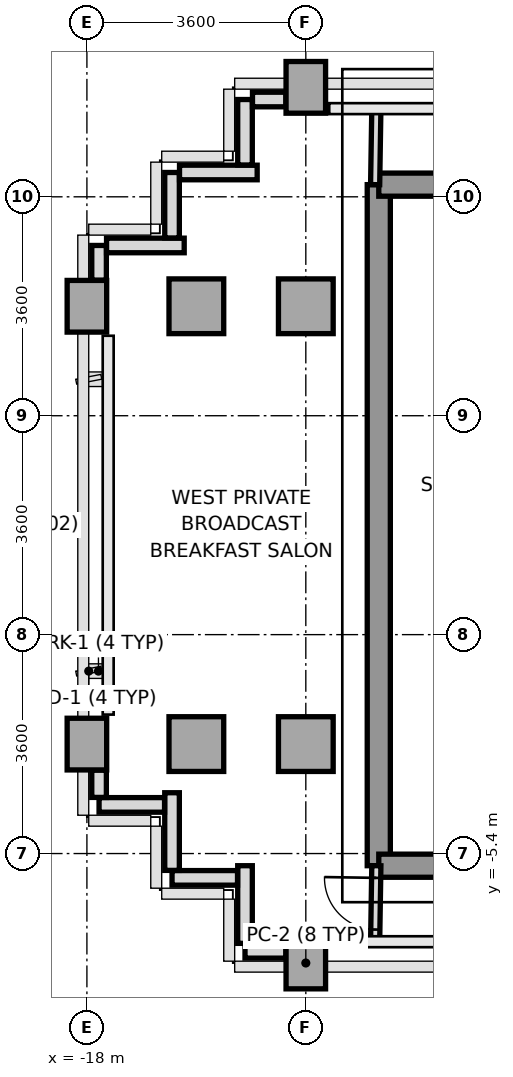
"""IFC4 building model, lengths in metres.
Left out: names, types, materials, properties, quantities, classifications, styles, units other than length and angle.
Written with IfcOpenShell. Run it as: python <this file> out.ifc"""

import sys

from ifc_helpers import new_model, si_unit, direction, frame, frame_2d, origin, origin_2d, place, context, subcontext, project, spatial, rectangle, extrude, source, transform, mapped, element, fill, save


model = new_model("IFC4")
c1 = context("Model", 3, precision=1e-05, world=origin(), true_north=direction((0.0, 1.0)))
c2 = subcontext(c1, "Body", "Model", "MODEL_VIEW")
j1 = project(units=[si_unit("LENGTHUNIT", "METRE"), si_unit("PLANEANGLEUNIT", "RADIAN")], contexts=[c1])
p1 = place(None, origin())
s1 = spatial("IfcSite", under=j1, at=p1, CompositionType="ELEMENT")
p2 = place(p1, origin())
s2 = spatial("IfcBuilding", under=s1, at=p2, CompositionType="ELEMENT")
p3 = place(p2, frame((0.0, 0.0, 197.8)))
s3 = spatial("IfcBuildingStorey", under=s2, at=p3, CompositionType="ELEMENT", Elevation=197.8)
m1 = source(origin(), c2, "Body", "SweptSolid", [
    extrude(rectangle(XDim=0.65, YDim=0.85, at=origin_2d()), origin(), (0.0, 0.0, 1.0), 3.2),
])
for number, where, z_axis, x_axis in (
    (1, (-18.0, -3.6, 0.0), (0.0, 0.0, 1.0), (1.0, 0.0, 0.0)),
    (2, (-18.0, 3.6, 0.0), (0.0, 0.0, 1.0), (1.0, 0.0, 0.0)),
):
    element("IfcColumn", number, at=place(p3, frame(where, z_axis=z_axis, x_axis=x_axis)), inside=s3, PredefinedType="COLUMN", context=c2, shape_type="MappedRepresentation", body=[
        mapped(m1, transform((0.0, 0.0, 0.0), x_axis=(1.0, 0.0, 0.0), y_axis=(0.0, 1.0, 0.0), z_axis=(0.0, 0.0, 1.0), scale=1.0)),
    ])
m2 = source(origin(), c2, "Body", "SweptSolid", [
    extrude(rectangle(XDim=0.9, YDim=0.9, at=origin_2d()), origin(), (0.0, 0.0, 1.0), 3.2),
])
for number, where, z_axis, x_axis in (
    (3, (-16.2, -3.6, 0.0), (0.0, 0.0, 1.0), (1.0, 0.0, 0.0)),
    (4, (-16.2, 3.6, 0.0), (0.0, 0.0, 1.0), (1.0, 0.0, 0.0)),
):
    element("IfcColumn", number, at=place(p3, frame(where, z_axis=z_axis, x_axis=x_axis)), inside=s3, PredefinedType="COLUMN", context=c2, shape_type="MappedRepresentation", body=[
        mapped(m2, transform((0.0, 0.0, 0.0), x_axis=(1.0, 0.0, 0.0), y_axis=(0.0, 1.0, 0.0), z_axis=(0.0, 0.0, 1.0), scale=1.0)),
    ])
p4 = place(p3, frame((-14.4, -7.2, 0.0), z_axis=(0.0, 0.0, 1.0), x_axis=(1.0, 0.0, 0.0)))
e5 = element("IfcColumn", 5, at=p4, inside=s3, PredefinedType="COLUMN", context=c2, shape_type="MappedRepresentation", body=[
    mapped(m1, transform((0.0, 0.0, 0.0), x_axis=(1.0, 0.0, 0.0), y_axis=(0.0, 1.0, 0.0), z_axis=(0.0, 0.0, 1.0), scale=1.0)),
])
for number, where, z_axis, x_axis in (
    (6, (-14.4, -3.6, 0.0), (0.0, 0.0, 1.0), (1.0, 0.0, 0.0)),
    (7, (-14.4, 3.6, 0.0), (0.0, 0.0, 1.0), (1.0, 0.0, 0.0)),
):
    element("IfcColumn", number, at=place(p3, frame(where, z_axis=z_axis, x_axis=x_axis)), inside=s3, PredefinedType="COLUMN", context=c2, shape_type="MappedRepresentation", body=[
        mapped(m2, transform((0.0, 0.0, 0.0), x_axis=(1.0, 0.0, 0.0), y_axis=(0.0, 1.0, 0.0), z_axis=(0.0, 0.0, 1.0), scale=1.0)),
    ])
p5 = place(p3, frame((-14.4, 7.2, 0.0), z_axis=(0.0, 0.0, 1.0), x_axis=(1.0, 0.0, 0.0)))
e8 = element("IfcColumn", 8, at=p5, inside=s3, PredefinedType="COLUMN", context=c2, shape_type="MappedRepresentation", body=[
    mapped(m1, transform((0.0, 0.0, 0.0), x_axis=(1.0, 0.0, 0.0), y_axis=(0.0, 1.0, 0.0), z_axis=(0.0, 0.0, 1.0), scale=1.0)),
])
p6 = place(p3, frame((-14.728, -7.0, 0.0), z_axis=(0.0, 0.0, 1.0), x_axis=(-1.0, 0.0, 0.0)))
e9 = element("IfcWall", 9, at=p6, inside=s3, PredefinedType="PARAPET", context=c2, shape_type="SweptSolid", body=[
    extrude(rectangle(XDim=0.672, YDim=0.24, at=frame_2d((0.336, 0.0))), origin(), (0.0, 0.0, 1.0), 1.15),
])
p7 = place(p3, frame((-15.4, -6.877, 0.0), z_axis=(0.0, 0.0, 1.0), x_axis=(0.0, 1.0, 0.0)))
e10 = element("IfcWall", 10, at=p7, inside=s3, PredefinedType="PARAPET", context=c2, shape_type="SweptSolid", body=[
    extrude(rectangle(XDim=1.277, YDim=0.24, at=frame_2d((0.638, 0.0))), origin(), (0.0, 0.0, 1.0), 1.15),
])
p8 = place(p3, frame((-15.523, -5.8, 0.0), z_axis=(0.0, 0.0, 1.0), x_axis=(-1.0, 0.0, 0.0)))
e11 = element("IfcWall", 11, at=p8, inside=s3, PredefinedType="PARAPET", context=c2, shape_type="SweptSolid", body=[
    extrude(rectangle(XDim=1.077, YDim=0.24, at=frame_2d((0.539, 0.0))), origin(), (0.0, 0.0, 1.0), 1.15),
])
p9 = place(p3, frame((-16.6, -5.677, 0.0), z_axis=(0.0, 0.0, 1.0), x_axis=(0.0, 1.0, 0.0)))
e12 = element("IfcWall", 12, at=p9, inside=s3, PredefinedType="PARAPET", context=c2, shape_type="SweptSolid", body=[
    extrude(rectangle(XDim=1.277, YDim=0.24, at=frame_2d((0.639, 0.0))), origin(), (0.0, 0.0, 1.0), 1.15),
])
p10 = place(p3, frame((-16.723, -4.6, 0.0), z_axis=(0.0, 0.0, 1.0), x_axis=(-1.0, 0.0, 0.0)))
e13 = element("IfcWall", 13, at=p10, inside=s3, PredefinedType="PARAPET", context=c2, shape_type="SweptSolid", body=[
    extrude(rectangle(XDim=1.077, YDim=0.24, at=frame_2d((0.539, 0.0))), origin(), (0.0, 0.0, 1.0), 1.15),
])
p11 = place(p3, frame((-17.8, -4.477, 0.0), z_axis=(0.0, 0.0, 1.0), x_axis=(0.0, 1.0, 0.0)))
e14 = element("IfcWall", 14, at=p11, inside=s3, PredefinedType="PARAPET", context=c2, shape_type="SweptSolid", body=[
    extrude(rectangle(XDim=0.449, YDim=0.24, at=frame_2d((0.225, 0.0))), origin(), (0.0, 0.0, 1.0), 1.15),
])
p12 = place(p3, frame((-17.8, 4.028, 0.0), z_axis=(0.0, 0.0, 1.0), x_axis=(0.0, 1.0, 0.0)))
e15 = element("IfcWall", 15, at=p12, inside=s3, PredefinedType="PARAPET", context=c2, shape_type="SweptSolid", body=[
    extrude(rectangle(XDim=0.572, YDim=0.24, at=frame_2d((0.286, 0.0))), origin(), (0.0, 0.0, 1.0), 1.15),
])
p13 = place(p3, frame((-17.677, 4.6, 0.0), z_axis=(0.0, 0.0, 1.0), x_axis=(1.0, 0.0, 0.0)))
e16 = element("IfcWall", 16, at=p13, inside=s3, PredefinedType="PARAPET", context=c2, shape_type="SweptSolid", body=[
    extrude(rectangle(XDim=1.277, YDim=0.24, at=frame_2d((0.639, 0.0))), origin(), (0.0, 0.0, 1.0), 1.15),
])
p14 = place(p3, frame((-16.6, 4.723, 0.0), z_axis=(0.0, 0.0, 1.0), x_axis=(0.0, 1.0, 0.0)))
e17 = element("IfcWall", 17, at=p14, inside=s3, PredefinedType="PARAPET", context=c2, shape_type="SweptSolid", body=[
    extrude(rectangle(XDim=1.077, YDim=0.24, at=frame_2d((0.539, 0.0))), origin(), (0.0, 0.0, 1.0), 1.15),
])
p15 = place(p3, frame((-16.477, 5.8, 0.0), z_axis=(0.0, 0.0, 1.0), x_axis=(1.0, 0.0, 0.0)))
e18 = element("IfcWall", 18, at=p15, inside=s3, PredefinedType="PARAPET", context=c2, shape_type="SweptSolid", body=[
    extrude(rectangle(XDim=1.277, YDim=0.24, at=frame_2d((0.639, 0.0))), origin(), (0.0, 0.0, 1.0), 1.15),
])
p16 = place(p3, frame((-15.4, 5.923, 0.0), z_axis=(0.0, 0.0, 1.0), x_axis=(0.0, 1.0, 0.0)))
e19 = element("IfcWall", 19, at=p16, inside=s3, PredefinedType="PARAPET", context=c2, shape_type="SweptSolid", body=[
    extrude(rectangle(XDim=1.077, YDim=0.24, at=frame_2d((0.539, 0.0))), origin(), (0.0, 0.0, 1.0), 1.15),
])
p17 = place(p3, frame((-15.277, 7.0, 0.0), z_axis=(0.0, 0.0, 1.0), x_axis=(1.0, 0.0, 0.0)))
e20 = element("IfcWall", 20, at=p17, inside=s3, PredefinedType="PARAPET", context=c2, shape_type="SweptSolid", body=[
    extrude(rectangle(XDim=0.549, YDim=0.24, at=frame_2d((0.274, 0.0))), origin(), (0.0, 0.0, 1.0), 1.15),
])
p18 = place(p3, frame((-13.2, -5.6, 0.0), z_axis=(0.0, 0.0, 1.0), x_axis=(0.0, 1.0, 0.0)))
e21 = element("IfcWall", 21, at=p18, inside=s3, PredefinedType="SHEAR", context=c2, shape_type="SweptSolid", body=[
    extrude(rectangle(XDim=11.2, YDim=0.38, at=frame_2d((5.6, 0.0))), origin(), (0.0, 0.0, 1.0), 3.2),
])
p19 = place(p3, frame((-13.2, 5.6, 0.0), z_axis=(0.0, 0.0, 1.0), x_axis=(1.0, 0.0, 0.0)))
e22 = element("IfcWall", 22, at=p19, inside=s3, PredefinedType="SHEAR", context=c2, shape_type="SweptSolid", body=[
    extrude(rectangle(XDim=1.844, YDim=0.38, at=frame_2d((0.922, 0.0))), origin(), (0.0, 0.0, 1.0), 3.2),
])
p20 = place(p3, frame((-13.2, -5.6, 0.0), z_axis=(0.0, 0.0, 1.0), x_axis=(1.0, 0.0, 0.0)))
e23 = element("IfcWall", 23, at=p20, inside=s3, PredefinedType="SHEAR", context=c2, shape_type="SweptSolid", body=[
    extrude(rectangle(XDim=7.8, YDim=0.38, at=frame_2d((3.9, 0.0))), origin(), (0.0, 0.0, 1.0), 3.2),
])
p21 = place(p3, frame((-13.26, 5.6, 0.0), z_axis=(0.0, 0.0, 1.0), x_axis=(0.016013571389, 0.999871774545, 0.0)))
e24 = element("IfcWall", 24, at=p21, inside=s3, PredefinedType="PARTITIONING", context=c2, shape_type="SweptSolid", body=[
    extrude(rectangle(XDim=1.25, YDim=0.15, at=frame_2d((0.625, 0.0))), origin(), (0.0, 0.0, 1.0), 3.2),
])
p22 = place(p3, frame((-13.26, -6.85, 0.0), z_axis=(0.0, 0.0, 1.0), x_axis=(0.016013571389, 0.999871774545, 0.0)))
e25 = element("IfcWall", 25, at=p22, inside=s3, PredefinedType="PARTITIONING", context=c2, shape_type="SweptSolid", body=[
    extrude(rectangle(XDim=1.25, YDim=0.15, at=frame_2d((0.625, 0.0))), origin(), (0.0, 0.0, 1.0), 3.2),
])
p23 = place(p22, frame((0.2, 0.0, 0.0)))
e26 = element("IfcOpeningElement", 26, at=p23, cuts=e25, PredefinedType="OPENING", context=c2, shape_type="SweptSolid", body=[
    extrude(rectangle(XDim=0.85, YDim=2.1, at=frame_2d((0.425, 1.05))), frame((0.0, 0.085, 0.0), z_axis=(0.0, -1.0, 0.0), x_axis=(1.0, 0.0, 0.0)), (0.0, 0.0, 1.0), 0.17),
])
m3 = source(origin(), c2, "Body", "SweptSolid", [
    extrude(rectangle(XDim=0.85, YDim=2.1, at=frame_2d((0.425, 1.05))), frame((0.0, 0.025, 0.0), z_axis=(0.0, -1.0, 0.0), x_axis=(1.0, 0.0, 0.0)), (0.0, 0.0, 1.0), 0.05),
])
p24 = place(p23, origin())
e27 = element("IfcDoor", 27, at=p24, inside=s3, OperationType="SINGLE_SWING_RIGHT", PredefinedType="DOOR", context=c2, shape_type="MappedRepresentation", body=[
    mapped(m3, transform((0.0, 0.0, 0.0), x_axis=(1.0, 0.0, 0.0), y_axis=(0.0, 1.0, 0.0), z_axis=(0.0, 0.0, 1.0), scale=1.0)),
])
fill(e26, e27)
save(model, sys.argv[1])
